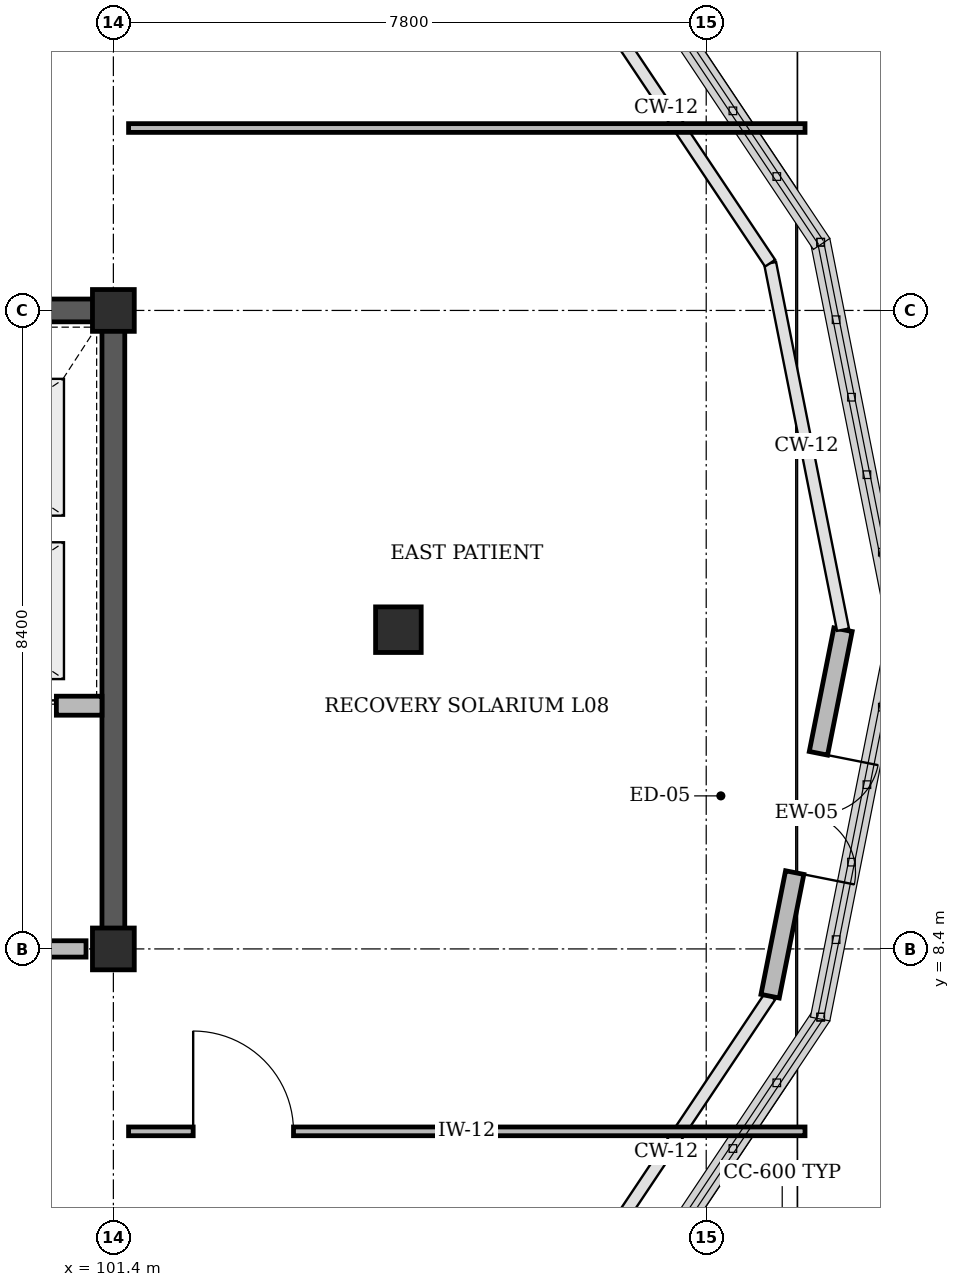
"""IFC4 building model, lengths in metres.
Left out: names, types, materials, properties, quantities, classifications, styles, units other than length and angle.
Written with IfcOpenShell. Run it as: python <this file> out.ifc"""

import sys

from ifc_helpers import new_model, si_unit, direction, frame, frame_2d, origin, origin_2d, place, context, subcontext, project, spatial, rectangle, circle, extrude, element, fill, save


model = new_model("IFC4")
c1 = context("Model", 3, precision=1e-05, world=origin(), true_north=direction((0.0, 1.0)))
c2 = subcontext(c1, "Body", "Model", "MODEL_VIEW")
j1 = project(units=[si_unit("LENGTHUNIT", "METRE"), si_unit("PLANEANGLEUNIT", "RADIAN")], contexts=[c1])
p1 = place(None, origin())
s1 = spatial("IfcSite", under=j1, at=p1, CompositionType="ELEMENT")
p2 = place(p1, origin())
s2 = spatial("IfcBuilding", under=s1, at=p2, CompositionType="ELEMENT")
p3 = place(p2, frame((0.0, 0.0, 34.8)))
s3 = spatial("IfcBuildingStorey", under=s2, at=p3, CompositionType="ELEMENT", Elevation=34.8)
p4 = place(p3, frame((93.45, 16.8, 0.0), z_axis=(0.0, 0.0, 1.0), x_axis=(1.0, 0.0, 0.0)))
e1 = element("IfcWall", 1, at=p4, inside=s3, PredefinedType="SHEAR", context=c2, shape_type="SweptSolid", body=[
    extrude(rectangle(XDim=8.1, YDim=0.3, at=frame_2d((4.05, 0.0))), origin(), (0.0, 0.0, 1.0), 3.92),
])
p5 = place(p3, frame((101.4, 8.4, 0.0), z_axis=(0.0, 0.0, 1.0), x_axis=(0.0, 1.0, 0.0)))
e2 = element("IfcWall", 2, at=p5, inside=s3, PredefinedType="SHEAR", context=c2, shape_type="SweptSolid", body=[
    extrude(rectangle(XDim=8.4, YDim=0.3, at=frame_2d((4.2, 0.0))), origin(), (0.0, 0.0, 1.0), 3.92),
])
for number, where, z_axis, x_axis in (
    (3, (101.4, 8.4, 0.0), (0.0, 0.0, 1.0), (1.0, 0.0, 0.0)),
    (4, (101.4, 16.8, 0.0), (0.0, 0.0, 1.0), (1.0, 0.0, 0.0)),
):
    element("IfcColumn", number, at=place(p3, frame(where, z_axis=z_axis, x_axis=x_axis)), inside=s3, PredefinedType="COLUMN", context=c2, shape_type="SweptSolid", body=[
        extrude(rectangle(XDim=0.55, YDim=0.55, at=origin_2d()), origin(), (0.0, 0.0, 1.0), 4.2),
    ])
p6 = place(p3, frame((105.15, 12.6, 0.0), z_axis=(0.0, 0.0, 1.0), x_axis=(1.0, 0.0, 0.0)))
e5 = element("IfcColumn", 5, at=p6, inside=s3, PredefinedType="PILASTER", context=c2, shape_type="SweptSolid", body=[
    extrude(circle(Radius=0.3, at=origin_2d()), origin(), (0.0, 0.0, 1.0), 3.95),
])
p7 = place(p3, frame((111.0, 12.6, 0.0), z_axis=(0.0, 0.0, 1.0), x_axis=(-0.195065517012, -0.980790214099, 0.0)))
e6 = element("IfcWall", 6, at=p7, inside=s3, PredefinedType="STANDARD", context=c2, shape_type="SweptSolid", body=[
    extrude(rectangle(XDim=4.916, YDim=0.245, at=frame_2d((2.458, 0.0))), origin(), (0.0, 0.0, 1.0), 3.32),
])
p8 = place(p7, frame((1.658, 0.0, 0.0)))
e7 = element("IfcOpeningElement", 7, at=p8, cuts=e6, PredefinedType="OPENING", context=c2, shape_type="SweptSolid", body=[
    extrude(rectangle(XDim=1.6, YDim=2.2, at=frame_2d((0.8, 1.1))), frame((0.0, 0.133, 0.0), z_axis=(0.0, -1.0, 0.0), x_axis=(1.0, 0.0, 0.0)), (0.0, 0.0, 1.0), 0.265),
])
p9 = place(p3, frame((97.75, 8.4, 0.0), z_axis=(0.0, 0.0, 1.0), x_axis=(1.0, 0.0, 0.0)))
e8 = element("IfcWall", 8, at=p9, inside=s3, PredefinedType="STANDARD", context=c2, shape_type="SweptSolid", body=[
    extrude(rectangle(XDim=3.29, YDim=0.215, at=frame_2d((1.645, 0.0))), origin(), (0.0, 0.0, 1.0), 3.32),
])
p10 = place(p9, frame((0.865, 0.0, 0.0)))
e9 = element("IfcOpeningElement", 9, at=p10, cuts=e8, PredefinedType="OPENING", context=c2, shape_type="SweptSolid", body=[
    extrude(rectangle(XDim=1.56, YDim=2.2, at=frame_2d((0.78, 1.1))), frame((0.0, 0.118, 0.0), z_axis=(0.0, -1.0, 0.0), x_axis=(1.0, 0.0, 0.0)), (0.0, 0.0, 1.0), 0.235),
])
p11 = place(p3, frame((97.75, 11.6, 0.0), z_axis=(0.0, 0.0, 1.0), x_axis=(1.0, 0.0, 0.0)))
e10 = element("IfcWall", 10, at=p11, inside=s3, PredefinedType="STANDARD", context=c2, shape_type="SweptSolid", body=[
    extrude(rectangle(XDim=3.5, YDim=0.25, at=frame_2d((1.75, 0.0))), origin(), (0.0, 0.0, 1.0), 3.9),
])
p12 = place(p11, frame((0.35, 0.0, 0.0)))
e11 = element("IfcOpeningElement", 11, at=p12, cuts=e10, PredefinedType="OPENING", context=c2, shape_type="SweptSolid", body=[
    extrude(rectangle(XDim=1.1, YDim=2.2, at=frame_2d((0.55, 1.1))), frame((0.0, 0.135, 0.0), z_axis=(0.0, -1.0, 0.0), x_axis=(1.0, 0.0, 0.0)), (0.0, 0.0, 1.0), 0.27),
])
p13 = place(p11, frame((1.8, 0.0, 0.0)))
e12 = element("IfcOpeningElement", 12, at=p13, cuts=e10, PredefinedType="OPENING", context=c2, shape_type="SweptSolid", body=[
    extrude(rectangle(XDim=1.1, YDim=2.2, at=frame_2d((0.55, 1.1))), frame((0.0, 0.135, 0.0), z_axis=(0.0, -1.0, 0.0), x_axis=(1.0, 0.0, 0.0)), (0.0, 0.0, 1.0), 0.27),
])
p14 = place(p3, frame((101.6, 6.0, 0.0), z_axis=(0.0, 0.0, 1.0), x_axis=(1.0, 0.0, 0.0)))
e13 = element("IfcWall", 13, at=p14, inside=s3, PredefinedType="PARTITIONING", context=c2, shape_type="SweptSolid", body=[
    extrude(rectangle(XDim=8.9, YDim=0.115, at=frame_2d((4.45, 0.0))), origin(), (0.0, 0.0, 1.0), 3.9),
])
p15 = place(p14, frame((0.85, 0.0, 0.0)))
e14 = element("IfcOpeningElement", 14, at=p15, cuts=e13, PredefinedType="OPENING", context=c2, shape_type="SweptSolid", body=[
    extrude(rectangle(XDim=1.32, YDim=2.15, at=frame_2d((0.66, 1.075))), frame((0.0, 0.067, 0.0), z_axis=(0.0, -1.0, 0.0), x_axis=(1.0, 0.0, 0.0)), (0.0, 0.0, 1.0), 0.135),
])
p16 = place(p3, frame((101.6, 19.2, 0.0), z_axis=(0.0, 0.0, 1.0), x_axis=(1.0, 0.0, 0.0)))
e15 = element("IfcWall", 15, at=p16, inside=s3, PredefinedType="PARTITIONING", context=c2, shape_type="SweptSolid", body=[
    extrude(rectangle(XDim=8.9, YDim=0.115, at=frame_2d((4.45, 0.0))), origin(), (0.0, 0.0, 1.0), 3.9),
])
p17 = place(p8, origin())
e16 = element("IfcDoor", 16, at=p17, inside=s3, OperationType="DOUBLE_DOOR_SINGLE_SWING", PredefinedType="DOOR", context=c2, shape_type="SweptSolid", body=[
    extrude(rectangle(XDim=1.6, YDim=2.2, at=frame_2d((0.8, 1.1))), frame((0.0, 0.025, 0.0), z_axis=(0.0, -1.0, 0.0), x_axis=(1.0, 0.0, 0.0)), (0.0, 0.0, 1.0), 0.05),
])
fill(e7, e16)
p18 = place(p13, origin())
e17 = element("IfcDoor", 17, at=p18, inside=s3, OperationType="SLIDING_TO_LEFT", PredefinedType="DOOR", context=c2, shape_type="SweptSolid", body=[
    extrude(rectangle(XDim=1.1, YDim=2.2, at=frame_2d((0.55, 1.1))), frame((0.0, 0.025, 0.0), z_axis=(0.0, -1.0, 0.0), x_axis=(1.0, 0.0, 0.0)), (0.0, 0.0, 1.0), 0.05),
])
fill(e12, e17)
p19 = place(p15, origin())
e18 = element("IfcDoor", 18, at=p19, inside=s3, OperationType="SINGLE_SWING_LEFT", PredefinedType="DOOR", context=c2, shape_type="SweptSolid", body=[
    extrude(rectangle(XDim=1.32, YDim=2.15, at=frame_2d((0.66, 1.075))), frame((0.0, 0.025, 0.0), z_axis=(0.0, -1.0, 0.0), x_axis=(1.0, 0.0, 0.0)), (0.0, 0.0, 1.0), 0.05),
])
fill(e14, e18)
save(model, sys.argv[1])
